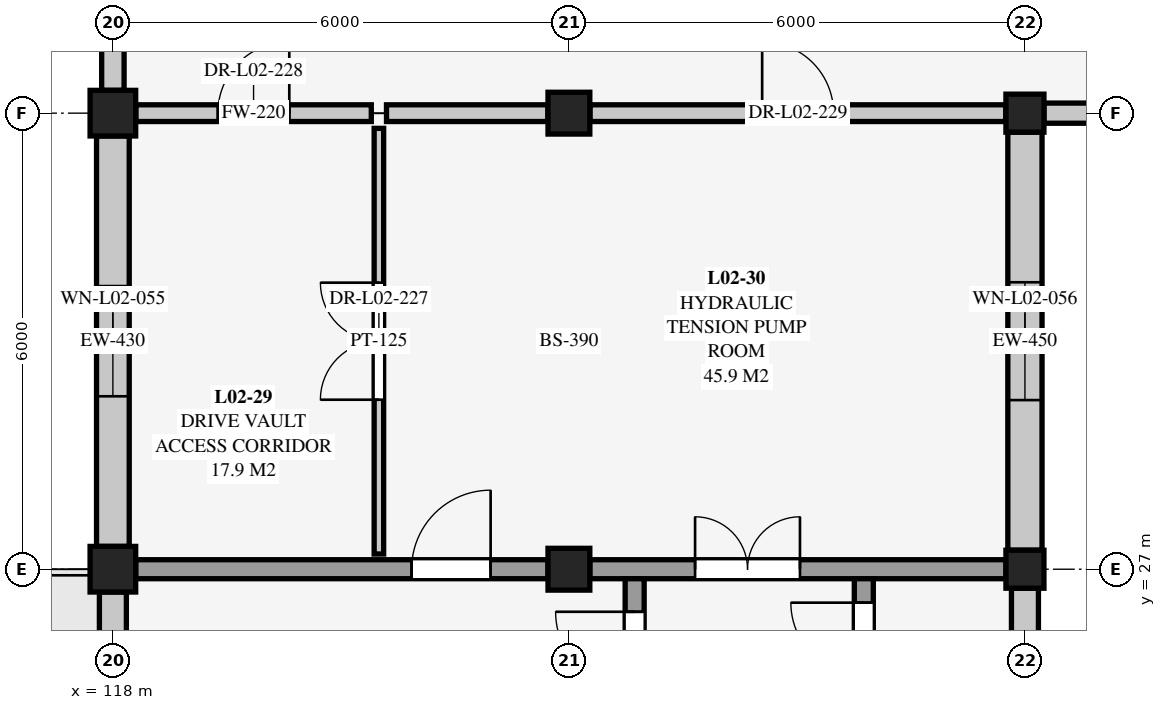
"""IFC4 building model, lengths in metres.
Left out: names, types, materials, properties, quantities, classifications, styles, units other than length and angle.
Written with IfcOpenShell. Run it as: python <this file> out.ifc"""

import sys

from ifc_helpers import new_model, si_unit, direction, frame, frame_2d, origin, origin_2d, place, context, subcontext, project, spatial, rectangle, extrude, element, fill, save


model = new_model("IFC4")
c1 = context("Model", 3, precision=1e-05, world=origin(), true_north=direction((0.0, 1.0)))
c2 = subcontext(c1, "Body", "Model", "MODEL_VIEW")
j1 = project(units=[si_unit("LENGTHUNIT", "METRE"), si_unit("PLANEANGLEUNIT", "RADIAN")], contexts=[c1])
p1 = place(None, origin())
s1 = spatial("IfcSite", under=j1, at=p1, CompositionType="ELEMENT")
p2 = place(p1, origin())
s2 = spatial("IfcBuilding", under=s1, at=p2, CompositionType="ELEMENT")
p3 = place(p2, frame((0.0, 0.0, 4.5)))
s3 = spatial("IfcBuildingStorey", under=s2, at=p3, CompositionType="ELEMENT", Elevation=4.5)
for number, where, z_axis, x_axis in (
    (1, (118.0, 27.0, 0.0), (0.0, 0.0, 1.0), (1.0, 0.0, 0.0)),
    (2, (118.0, 33.0, 0.0), (0.0, 0.0, 1.0), (1.0, 0.0, 0.0)),
):
    element("IfcColumn", number, at=place(p3, frame(where, z_axis=z_axis, x_axis=x_axis)), inside=s3, PredefinedType="COLUMN", context=c2, shape_type="SweptSolid", body=[
        extrude(rectangle(XDim=0.6, YDim=0.6, at=origin_2d()), origin(), (0.0, 0.0, 1.0), 4.5),
    ])
for number, where, z_axis, x_axis in (
    (3, (124.0, 27.0, 0.0), (0.0, 0.0, 1.0), (1.0, 0.0, 0.0)),
    (4, (124.0, 33.0, 0.0), (0.0, 0.0, 1.0), (1.0, 0.0, 0.0)),
):
    element("IfcColumn", number, at=place(p3, frame(where, z_axis=z_axis, x_axis=x_axis)), inside=s3, PredefinedType="COLUMN", context=c2, shape_type="SweptSolid", body=[
        extrude(rectangle(XDim=0.55, YDim=0.55, at=origin_2d()), origin(), (0.0, 0.0, 1.0), 4.5),
    ])
for number, where, z_axis, x_axis in (
    (5, (130.0, 27.0, 0.0), (0.0, 0.0, 1.0), (1.0, 0.0, 0.0)),
    (6, (130.0, 33.0, 0.0), (0.0, 0.0, 1.0), (1.0, 0.0, 0.0)),
):
    element("IfcColumn", number, at=place(p3, frame(where, z_axis=z_axis, x_axis=x_axis)), inside=s3, PredefinedType="COLUMN", context=c2, shape_type="SweptSolid", body=[
        extrude(rectangle(XDim=0.5, YDim=0.5, at=origin_2d()), origin(), (0.0, 0.0, 1.0), 4.5),
    ])
p4 = place(p3, frame((118.0, 21.3, 0.0), z_axis=(0.0, 0.0, 1.0), x_axis=(0.0, 1.0, 0.0)))
e7 = element("IfcWall", 7, at=p4, inside=s3, PredefinedType="SOLIDWALL", context=c2, shape_type="SweptSolid", body=[
    extrude(rectangle(XDim=5.4, YDim=0.355, at=frame_2d((2.7, 0.0))), origin(), (0.0, 0.0, 1.0), 3.797),
])
p5 = place(p3, frame((130.0, 26.75, 0.0), z_axis=(0.0, 0.0, 1.0), x_axis=(0.0, -1.0, 0.0)))
e8 = element("IfcWall", 8, at=p5, inside=s3, PredefinedType="SOLIDWALL", context=c2, shape_type="SweptSolid", body=[
    extrude(rectangle(XDim=5.5, YDim=0.355, at=frame_2d((2.75, 0.0))), origin(), (0.0, 0.0, 1.0), 3.797),
])
p6 = place(p3, frame((118.0, 27.3, 0.0), z_axis=(0.0, 0.0, 1.0), x_axis=(0.0, 1.0, 0.0)))
e9 = element("IfcWall", 9, at=p6, inside=s3, PredefinedType="SOLIDWALL", context=c2, shape_type="SweptSolid", body=[
    extrude(rectangle(XDim=5.4, YDim=0.43, at=frame_2d((2.7, 0.0))), origin(), (0.0, 0.0, 1.0), 3.778),
])
p7 = place(p6, frame((1.975, 0.0, 0.75)))
e10 = element("IfcOpeningElement", 10, at=p7, cuts=e9, PredefinedType="OPENING", context=c2, shape_type="SweptSolid", body=[
    extrude(rectangle(XDim=1.45, YDim=2.25, at=frame_2d((0.725, 1.125))), frame((0.0, 0.225, 0.0), z_axis=(0.0, -1.0, 0.0), x_axis=(1.0, 0.0, 0.0)), (0.0, 0.0, 1.0), 0.45),
])
p8 = place(p3, frame((130.0, 32.75, 0.0), z_axis=(0.0, 0.0, 1.0), x_axis=(0.0, -1.0, 0.0)))
e11 = element("IfcWall", 11, at=p8, inside=s3, PredefinedType="SOLIDWALL", context=c2, shape_type="SweptSolid", body=[
    extrude(rectangle(XDim=5.5, YDim=0.45, at=frame_2d((2.75, 0.0))), origin(), (0.0, 0.0, 1.0), 3.778),
])
p9 = place(p8, frame((1.975, 0.0, 0.75)))
e12 = element("IfcOpeningElement", 12, at=p9, cuts=e11, PredefinedType="OPENING", context=c2, shape_type="SweptSolid", body=[
    extrude(rectangle(XDim=1.55, YDim=2.25, at=frame_2d((0.775, 1.125))), frame((0.0, 0.235, 0.0), z_axis=(0.0, -1.0, 0.0), x_axis=(1.0, 0.0, 0.0)), (0.0, 0.0, 1.0), 0.47),
])
p10 = place(p3, frame((135.75, 33.0, 0.0), z_axis=(0.0, 0.0, 1.0), x_axis=(-1.0, 0.0, 0.0)))
e13 = element("IfcWall", 13, at=p10, inside=s3, PredefinedType="SOLIDWALL", context=c2, shape_type="SweptSolid", body=[
    extrude(rectangle(XDim=5.5, YDim=0.265, at=frame_2d((2.75, 0.0))), origin(), (0.0, 0.0, 1.0), 3.778),
])
p11 = place(p10, frame((1.925, 0.0, 0.75)))
e14 = element("IfcOpeningElement", 14, at=p11, cuts=e13, PredefinedType="OPENING", context=c2, shape_type="SweptSolid", body=[
    extrude(rectangle(XDim=1.65, YDim=2.3, at=frame_2d((0.825, 1.15))), frame((0.0, 0.142, 0.0), z_axis=(0.0, -1.0, 0.0), x_axis=(1.0, 0.0, 0.0)), (0.0, 0.0, 1.0), 0.285),
])
p12 = place(p3, frame((118.0, 33.3, 0.0), z_axis=(0.0, 0.0, 1.0), x_axis=(0.0, 1.0, 0.0)))
e15 = element("IfcWall", 15, at=p12, inside=s3, PredefinedType="SOLIDWALL", context=c2, shape_type="SweptSolid", body=[
    extrude(rectangle(XDim=5.4, YDim=0.295, at=frame_2d((2.7, 0.0))), origin(), (0.0, 0.0, 1.0), 3.778),
])
p13 = place(p12, frame((1.775, 0.0, 0.7)))
e16 = element("IfcOpeningElement", 16, at=p13, cuts=e15, PredefinedType="OPENING", context=c2, shape_type="SweptSolid", body=[
    extrude(rectangle(XDim=1.85, YDim=2.35, at=frame_2d((0.925, 1.175))), frame((0.0, 0.157, 0.0), z_axis=(0.0, -1.0, 0.0), x_axis=(1.0, 0.0, 0.0)), (0.0, 0.0, 1.0), 0.315),
])
p14 = place(p3, frame((118.3, 27.0, 0.0), z_axis=(0.0, 0.0, 1.0), x_axis=(1.0, 0.0, 0.0)))
e17 = element("IfcWall", 17, at=p14, inside=s3, PredefinedType="SHEAR", context=c2, shape_type="SweptSolid", body=[
    extrude(rectangle(XDim=5.425, YDim=0.25, at=frame_2d((2.712, 0.0))), origin(), (0.0, 0.0, 1.0), 4.204),
])
p15 = place(p14, frame((3.63, 0.0, 0.0)))
e18 = element("IfcOpeningElement", 18, at=p15, cuts=e17, PredefinedType="OPENING", context=c2, shape_type="SweptSolid", body=[
    extrude(rectangle(XDim=1.04, YDim=2.14, at=frame_2d((0.52, 1.07))), frame((0.0, 0.135, 0.0), z_axis=(0.0, -1.0, 0.0), x_axis=(1.0, 0.0, 0.0)), (0.0, 0.0, 1.0), 0.27),
])
p16 = place(p3, frame((124.275, 27.0, 0.0), z_axis=(0.0, 0.0, 1.0), x_axis=(1.0, 0.0, 0.0)))
e19 = element("IfcWall", 19, at=p16, inside=s3, PredefinedType="SHEAR", context=c2, shape_type="SweptSolid", body=[
    extrude(rectangle(XDim=5.475, YDim=0.25, at=frame_2d((2.738, 0.0))), origin(), (0.0, 0.0, 1.0), 4.204),
])
p17 = place(p16, frame((1.385, 0.0, 0.0)))
e20 = element("IfcOpeningElement", 20, at=p17, cuts=e19, PredefinedType="OPENING", context=c2, shape_type="SweptSolid", body=[
    extrude(rectangle(XDim=1.38, YDim=2.16, at=frame_2d((0.69, 1.08))), frame((0.0, 0.135, 0.0), z_axis=(0.0, -1.0, 0.0), x_axis=(1.0, 0.0, 0.0)), (0.0, 0.0, 1.0), 0.27),
])
p18 = place(p3, frame((124.865, 21.125, 0.0), z_axis=(0.0, 0.0, 1.0), x_axis=(0.0, 1.0, 0.0)))
e21 = element("IfcWall", 21, at=p18, inside=s3, PredefinedType="SHEAR", context=c2, shape_type="SweptSolid", body=[
    extrude(rectangle(XDim=5.75, YDim=0.25, at=frame_2d((2.875, 0.0))), origin(), (0.0, 0.0, 1.0), 4.204),
])
p19 = place(p18, frame((4.275, 0.0, 0.0)))
e22 = element("IfcOpeningElement", 22, at=p19, cuts=e21, PredefinedType="OPENING", context=c2, shape_type="SweptSolid", body=[
    extrude(rectangle(XDim=1.04, YDim=2.14, at=frame_2d((0.52, 1.07))), frame((0.0, 0.135, 0.0), z_axis=(0.0, -1.0, 0.0), x_axis=(1.0, 0.0, 0.0)), (0.0, 0.0, 1.0), 0.27),
])
p20 = place(p3, frame((127.88, 24.2, 0.0), z_axis=(0.0, 0.0, 1.0), x_axis=(0.0, 1.0, 0.0)))
e23 = element("IfcWall", 23, at=p20, inside=s3, PredefinedType="SHEAR", context=c2, shape_type="SweptSolid", body=[
    extrude(rectangle(XDim=2.675, YDim=0.25, at=frame_2d((1.337, 0.0))), origin(), (0.0, 0.0, 1.0), 4.204),
])
p21 = place(p20, frame((0.28, 0.0, 0.0)))
e24 = element("IfcOpeningElement", 24, at=p21, cuts=e23, PredefinedType="OPENING", context=c2, shape_type="SweptSolid", body=[
    extrude(rectangle(XDim=0.88, YDim=2.08, at=frame_2d((0.44, 1.04))), frame((0.0, 0.135, 0.0), z_axis=(0.0, -1.0, 0.0), x_axis=(1.0, 0.0, 0.0)), (0.0, 0.0, 1.0), 0.27),
])
p22 = place(p20, frame((1.4, 0.0, 0.0)))
e25 = element("IfcOpeningElement", 25, at=p22, cuts=e23, PredefinedType="OPENING", context=c2, shape_type="SweptSolid", body=[
    extrude(rectangle(XDim=0.96, YDim=2.12, at=frame_2d((0.48, 1.06))), frame((0.0, 0.135, 0.0), z_axis=(0.0, -1.0, 0.0), x_axis=(1.0, 0.0, 0.0)), (0.0, 0.0, 1.0), 0.27),
])
p23 = place(p3, frame((121.5, 27.2, 0.0), z_axis=(0.0, 0.0, 1.0), x_axis=(0.0, 1.0, 0.0)))
e26 = element("IfcWall", 26, at=p23, inside=s3, PredefinedType="PARTITIONING", context=c2, shape_type="SweptSolid", body=[
    extrude(rectangle(XDim=5.6, YDim=0.125, at=frame_2d((2.8, 0.0))), origin(), (0.0, 0.0, 1.0), 4.204),
])
p24 = place(p23, frame((2.03, 0.0, 0.0)))
e27 = element("IfcOpeningElement", 27, at=p24, cuts=e26, PredefinedType="OPENING", context=c2, shape_type="SweptSolid", body=[
    extrude(rectangle(XDim=1.54, YDim=2.26, at=frame_2d((0.77, 1.13))), frame((0.0, 0.073, 0.0), z_axis=(0.0, -1.0, 0.0), x_axis=(1.0, 0.0, 0.0)), (0.0, 0.0, 1.0), 0.145),
])
p25 = place(p3, frame((118.302, 33.0, 0.0), z_axis=(0.0, 0.0, 1.0), x_axis=(1.0, 0.0, 0.0)))
e28 = element("IfcWall", 28, at=p25, inside=s3, PredefinedType="SOLIDWALL", context=c2, shape_type="SweptSolid", body=[
    extrude(rectangle(XDim=3.098, YDim=0.22, at=frame_2d((1.549, 0.0))), origin(), (0.0, 0.0, 1.0), 3.722),
])
p26 = place(p25, frame((1.079, 0.0, 0.0)))
e29 = element("IfcOpeningElement", 29, at=p26, cuts=e28, PredefinedType="OPENING", context=c2, shape_type="SweptSolid", body=[
    extrude(rectangle(XDim=0.94, YDim=2.1, at=frame_2d((0.47, 1.05))), frame((0.0, 0.12, 0.0), z_axis=(0.0, -1.0, 0.0), x_axis=(1.0, 0.0, 0.0)), (0.0, 0.0, 1.0), 0.24),
])
p27 = place(p3, frame((124.277, 33.0, 0.0), z_axis=(0.0, 0.0, 1.0), x_axis=(1.0, 0.0, 0.0)))
e30 = element("IfcWall", 30, at=p27, inside=s3, PredefinedType="SOLIDWALL", context=c2, shape_type="SweptSolid", body=[
    extrude(rectangle(XDim=5.471, YDim=0.22, at=frame_2d((2.735, 0.0))), origin(), (0.0, 0.0, 1.0), 3.646),
])
p28 = place(p27, frame((2.265, 0.0, 0.0)))
e31 = element("IfcOpeningElement", 31, at=p28, cuts=e30, PredefinedType="OPENING", context=c2, shape_type="SweptSolid", body=[
    extrude(rectangle(XDim=0.94, YDim=2.1, at=frame_2d((0.47, 1.05))), frame((0.0, 0.12, 0.0), z_axis=(0.0, -1.0, 0.0), x_axis=(1.0, 0.0, 0.0)), (0.0, 0.0, 1.0), 0.24),
])
p29 = place(p3, frame((121.6, 33.0, 0.0), z_axis=(0.0, 0.0, 1.0), x_axis=(1.0, 0.0, 0.0)))
e32 = element("IfcWall", 32, at=p29, inside=s3, PredefinedType="SOLIDWALL", context=c2, shape_type="SweptSolid", body=[
    extrude(rectangle(XDim=2.123, YDim=0.22, at=frame_2d((1.062, 0.0))), origin(), (0.0, 0.0, 1.0), 3.722),
])
p30 = place(p7, origin())
e33 = element("IfcWindow", 33, at=p30, inside=s3, PartitioningType="SINGLE_PANEL", PredefinedType="WINDOW", context=c2, shape_type="SweptSolid", body=[
    extrude(rectangle(XDim=1.45, YDim=2.25, at=frame_2d((0.725, 1.125))), frame((0.0, 0.03, 0.0), z_axis=(0.0, -1.0, 0.0), x_axis=(1.0, 0.0, 0.0)), (0.0, 0.0, 1.0), 0.06),
])
fill(e10, e33)
p31 = place(p9, origin())
e34 = element("IfcWindow", 34, at=p31, inside=s3, PartitioningType="SINGLE_PANEL", PredefinedType="WINDOW", context=c2, shape_type="SweptSolid", body=[
    extrude(rectangle(XDim=1.55, YDim=2.25, at=frame_2d((0.775, 1.125))), frame((0.0, 0.03, 0.0), z_axis=(0.0, -1.0, 0.0), x_axis=(1.0, 0.0, 0.0)), (0.0, 0.0, 1.0), 0.06),
])
fill(e12, e34)
p32 = place(p15, origin())
e35 = element("IfcDoor", 35, at=p32, inside=s3, OperationType="SINGLE_SWING_RIGHT", PredefinedType="DOOR", context=c2, shape_type="SweptSolid", body=[
    extrude(rectangle(XDim=1.04, YDim=2.14, at=frame_2d((0.52, 1.07))), frame((0.0, 0.025, 0.0), z_axis=(0.0, -1.0, 0.0), x_axis=(1.0, 0.0, 0.0)), (0.0, 0.0, 1.0), 0.05),
])
fill(e18, e35)
p33 = place(p17, origin())
e36 = element("IfcDoor", 36, at=p33, inside=s3, OperationType="DOUBLE_DOOR_SINGLE_SWING", PredefinedType="DOOR", context=c2, shape_type="SweptSolid", body=[
    extrude(rectangle(XDim=1.38, YDim=2.16, at=frame_2d((0.69, 1.08))), frame((0.0, 0.025, 0.0), z_axis=(0.0, -1.0, 0.0), x_axis=(1.0, 0.0, 0.0)), (0.0, 0.0, 1.0), 0.05),
])
fill(e20, e36)
p34 = place(p19, origin())
e37 = element("IfcDoor", 37, at=p34, inside=s3, OperationType="SINGLE_SWING_RIGHT", PredefinedType="DOOR", context=c2, shape_type="SweptSolid", body=[
    extrude(rectangle(XDim=1.04, YDim=2.14, at=frame_2d((0.52, 1.07))), frame((0.0, 0.025, 0.0), z_axis=(0.0, -1.0, 0.0), x_axis=(1.0, 0.0, 0.0)), (0.0, 0.0, 1.0), 0.05),
])
fill(e22, e37)
p35 = place(p22, origin())
e38 = element("IfcDoor", 38, at=p35, inside=s3, OperationType="SINGLE_SWING_RIGHT", PredefinedType="DOOR", context=c2, shape_type="SweptSolid", body=[
    extrude(rectangle(XDim=0.96, YDim=2.12, at=frame_2d((0.48, 1.06))), frame((0.0, 0.025, 0.0), z_axis=(0.0, -1.0, 0.0), x_axis=(1.0, 0.0, 0.0)), (0.0, 0.0, 1.0), 0.05),
])
fill(e25, e38)
p36 = place(p24, origin())
e39 = element("IfcDoor", 39, at=p36, inside=s3, OperationType="DOUBLE_DOOR_SINGLE_SWING", PredefinedType="DOOR", context=c2, shape_type="SweptSolid", body=[
    extrude(rectangle(XDim=1.54, YDim=2.26, at=frame_2d((0.77, 1.13))), frame((0.0, 0.025, 0.0), z_axis=(0.0, -1.0, 0.0), x_axis=(1.0, 0.0, 0.0)), (0.0, 0.0, 1.0), 0.05),
])
fill(e27, e39)
p37 = place(p26, origin())
e40 = element("IfcDoor", 40, at=p37, inside=s3, OperationType="SINGLE_SWING_RIGHT", PredefinedType="DOOR", context=c2, shape_type="SweptSolid", body=[
    extrude(rectangle(XDim=0.94, YDim=2.1, at=frame_2d((0.47, 1.05))), frame((0.0, 0.025, 0.0), z_axis=(0.0, -1.0, 0.0), x_axis=(1.0, 0.0, 0.0)), (0.0, 0.0, 1.0), 0.05),
])
fill(e29, e40)
p38 = place(p28, origin())
e41 = element("IfcDoor", 41, at=p38, inside=s3, OperationType="SINGLE_SWING_LEFT", PredefinedType="DOOR", context=c2, shape_type="SweptSolid", body=[
    extrude(rectangle(XDim=0.94, YDim=2.1, at=frame_2d((0.47, 1.05))), frame((0.0, 0.025, 0.0), z_axis=(0.0, -1.0, 0.0), x_axis=(1.0, 0.0, 0.0)), (0.0, 0.0, 1.0), 0.05),
])
fill(e31, e41)
save(model, sys.argv[1])
